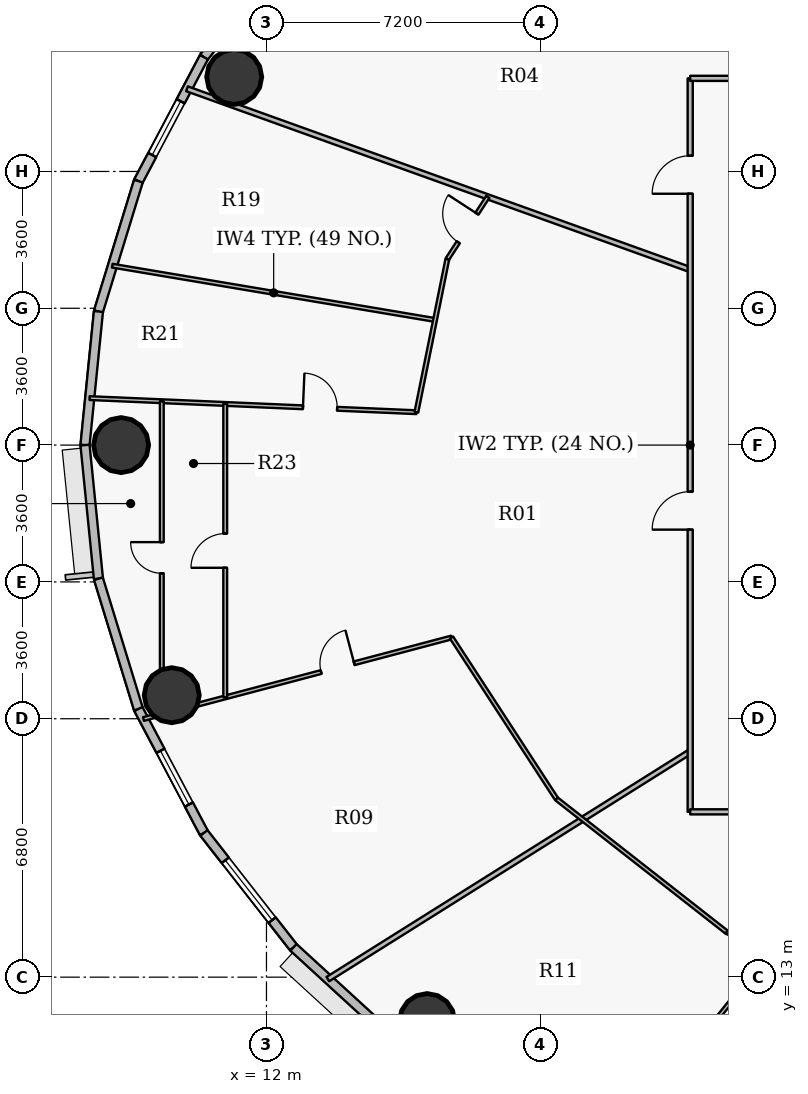
"""IFC4 building model, lengths in metres.
Left out: names, types, materials, properties, quantities, classifications, styles, units other than length and angle.
Written with IfcOpenShell. Run it as: python <this file> out.ifc"""

import sys

from ifc_helpers import new_model, si_unit, direction, frame, frame_2d, origin, origin_2d, place, context, subcontext, project, spatial, rectangle, hollow_circle, extrude, source, transform, mapped, element, fill, save


model = new_model("IFC4")
c1 = context("Model", 3, precision=1e-05, world=origin(), true_north=direction((0.0, 1.0)))
c2 = subcontext(c1, "Body", "Model", "MODEL_VIEW")
j1 = project(units=[si_unit("LENGTHUNIT", "METRE"), si_unit("PLANEANGLEUNIT", "RADIAN")], contexts=[c1])
p1 = place(None, origin())
s1 = spatial("IfcSite", under=j1, at=p1, CompositionType="ELEMENT")
p2 = place(p1, origin())
s2 = spatial("IfcBuilding", under=s1, at=p2, CompositionType="ELEMENT")
p3 = place(p2, frame((0.0, 0.0, 119.7)))
s3 = spatial("IfcBuildingStorey", under=s2, at=p3, CompositionType="ELEMENT", Elevation=119.7)
for number, where, z_axis, x_axis in (
    (1, (11.151, 36.688, 0.0), (0.0, 0.0, 1.0), (1.0, 0.0, 0.0)),
    (2, (8.175, 27.0, 0.0), (0.0, 0.0, 1.0), (1.0, 0.0, 0.0)),
    (3, (9.507, 20.419, 0.0), (0.0, 0.0, 1.0), (1.0, 0.0, 0.0)),
    (4, (16.227, 11.844, 0.0), (0.0, 0.0, 1.0), (1.0, 0.0, 0.0)),
):
    element("IfcColumn", number, at=place(p3, frame(where, z_axis=z_axis, x_axis=x_axis)), inside=s3, PredefinedType="COLUMN", context=c2, shape_type="SweptSolid", body=[
        extrude(hollow_circle(Radius=0.725, WallThickness=0.042, at=origin_2d()), origin(), (0.0, 0.0, 1.0), 3.75),
    ])
p4 = place(p3, frame((10.355, 37.206, 0.0), z_axis=(0.0, 0.0, 1.0), x_axis=(0.616272103517, 0.787533297345, 0.0)))
e5 = element("IfcWall", 5, at=p4, inside=s3, PredefinedType="SOLIDWALL", context=c2, shape_type="SweptSolid", body=[
    extrude(rectangle(XDim=3.823, YDim=0.24, at=frame_2d((1.912, 0.0))), origin(), (0.0, 0.0, 1.0), 3.5),
])
p5 = place(p4, frame((1.387, 0.0, 0.0)))
e6 = element("IfcOpeningElement", 6, at=p5, cuts=e5, PredefinedType="OPENING", context=c2, shape_type="SweptSolid", body=[
    extrude(rectangle(XDim=1.05, YDim=2.15, at=origin_2d()), frame((0.525, 0.13, 1.075), z_axis=(0.0, -1.0, 0.0), x_axis=(1.0, 0.0, 0.0)), (0.0, 0.0, 1.0), 0.26),
])
p6 = place(p3, frame((8.63, 33.945, 0.0), z_axis=(0.0, 0.0, 1.0), x_axis=(0.467614004126, 0.883932770716, 0.0)))
e7 = element("IfcWall", 7, at=p6, inside=s3, PredefinedType="SOLIDWALL", context=c2, shape_type="SweptSolid", body=[
    extrude(rectangle(XDim=3.689, YDim=0.24, at=frame_2d((1.844, 0.0))), origin(), (0.0, 0.0, 1.0), 3.5),
])
p7 = place(p6, frame((0.778, 0.0, 0.9)))
e8 = element("IfcOpeningElement", 8, at=p7, cuts=e7, PredefinedType="OPENING", context=c2, shape_type="SweptSolid", body=[
    extrude(rectangle(XDim=1.6, YDim=1.75, at=origin_2d()), frame((0.8, 0.13, 0.875), z_axis=(0.0, -1.0, 0.0), x_axis=(1.0, 0.0, 0.0)), (0.0, 0.0, 1.0), 0.26),
])
p8 = place(p3, frame((7.578, 30.515, 0.0), z_axis=(0.0, 0.0, 1.0), x_axis=(0.293124431344, 0.956074300329, 0.0)))
e9 = element("IfcWall", 9, at=p8, inside=s3, PredefinedType="SOLIDWALL", context=c2, shape_type="SweptSolid", body=[
    extrude(rectangle(XDim=3.587, YDim=0.24, at=frame_2d((1.793, 0.0))), origin(), (0.0, 0.0, 1.0), 3.5),
])
for number, where, z_axis, x_axis in (
    (10, (7.225, 27.0, 0.0), (0.0, 0.0, 1.0), (0.1, 0.995, 0.0)),
    (11, (7.578, 23.485, 0.0), (0.0, 0.0, 1.0), (-0.1, 0.995, 0.0)),
):
    element("IfcWall", number, at=place(p3, frame(where, z_axis=z_axis, x_axis=x_axis)), inside=s3, PredefinedType="SOLIDWALL", context=c2, shape_type="SweptSolid", body=[
        extrude(rectangle(XDim=3.533, YDim=0.24, at=frame_2d((1.767, 0.0))), origin(), (0.0, 0.0, 1.0), 3.5),
    ])
p9 = place(p3, frame((8.63, 20.055, 0.0), z_axis=(0.0, 0.0, 1.0), x_axis=(-0.293124431344, 0.956074300329, 0.0)))
e12 = element("IfcWall", 12, at=p9, inside=s3, PredefinedType="SOLIDWALL", context=c2, shape_type="SweptSolid", body=[
    extrude(rectangle(XDim=3.587, YDim=0.24, at=frame_2d((1.793, 0.0))), origin(), (0.0, 0.0, 1.0), 3.5),
])
p10 = place(p3, frame((10.355, 16.794, 0.0), z_axis=(0.0, 0.0, 1.0), x_axis=(-0.467614004126, 0.883932770716, 0.0)))
e13 = element("IfcWall", 13, at=p10, inside=s3, PredefinedType="SOLIDWALL", context=c2, shape_type="SweptSolid", body=[
    extrude(rectangle(XDim=3.689, YDim=0.24, at=frame_2d((1.844, 0.0))), origin(), (0.0, 0.0, 1.0), 3.5),
])
p11 = place(p10, frame((0.846, 0.0, 0.9)))
e14 = element("IfcOpeningElement", 14, at=p11, cuts=e13, PredefinedType="OPENING", context=c2, shape_type="SweptSolid", body=[
    extrude(rectangle(XDim=1.6, YDim=1.75, at=origin_2d()), frame((0.8, 0.13, 0.875), z_axis=(0.0, -1.0, 0.0), x_axis=(1.0, 0.0, 0.0)), (0.0, 0.0, 1.0), 0.26),
])
p12 = place(p3, frame((12.711, 13.783, 0.0), z_axis=(0.0, 0.0, 1.0), x_axis=(-0.616272103517, 0.787533297345, 0.0)))
e15 = element("IfcWall", 15, at=p12, inside=s3, PredefinedType="SOLIDWALL", context=c2, shape_type="SweptSolid", body=[
    extrude(rectangle(XDim=3.823, YDim=0.24, at=frame_2d((1.912, 0.0))), origin(), (0.0, 0.0, 1.0), 3.5),
])
p13 = place(p12, frame((0.912, 0.0, 0.9)))
e16 = element("IfcOpeningElement", 16, at=p13, cuts=e15, PredefinedType="OPENING", context=c2, shape_type="SweptSolid", body=[
    extrude(rectangle(XDim=2.0, YDim=1.75, at=origin_2d()), frame((1.0, 0.13, 0.875), z_axis=(0.0, -1.0, 0.0), x_axis=(1.0, 0.0, 0.0)), (0.0, 0.0, 1.0), 0.26),
])
p14 = place(p3, frame((15.642, 11.097, 0.0), z_axis=(0.0, 0.0, 1.0), x_axis=(-0.737113356241, 0.675769117414, 0.0)))
e17 = element("IfcWall", 17, at=p14, inside=s3, PredefinedType="SOLIDWALL", context=c2, shape_type="SweptSolid", body=[
    extrude(rectangle(XDim=3.976, YDim=0.24, at=frame_2d((1.988, 0.0))), origin(), (0.0, 0.0, 1.0), 3.5),
])
p15 = place(p3, frame((7.344, 28.236, 0.0), z_axis=(0.0, 0.0, 1.0), x_axis=(0.9990704445, -0.043107388317, 0.0)))
e18 = element("IfcWall", 18, at=p15, inside=s3, PredefinedType="PARTITIONING", context=c2, shape_type="SweptSolid", body=[
    extrude(rectangle(XDim=8.609, YDim=0.1, at=frame_2d((4.304, 0.0))), origin(), (0.0, 0.0, 1.0), 2.935),
])
p16 = place(p15, frame((5.621, 0.0, 0.0)))
e19 = element("IfcOpeningElement", 19, at=p16, cuts=e18, PredefinedType="OPENING", context=c2, shape_type="SweptSolid", body=[
    extrude(rectangle(XDim=0.9, YDim=2.1, at=origin_2d()), frame((0.45, 0.06, 1.05), z_axis=(0.0, -1.0, 0.0), x_axis=(1.0, 0.0, 0.0)), (0.0, 0.0, 1.0), 0.12),
])
p17 = place(p3, frame((7.943, 31.721, 0.0), z_axis=(0.0, 0.0, 1.0), x_axis=(0.986139151265, -0.165920385556, 0.0)))
e20 = element("IfcWall", 20, at=p17, inside=s3, PredefinedType="PARTITIONING", context=c2, shape_type="SweptSolid", body=[
    extrude(rectangle(XDim=8.612, YDim=0.1, at=frame_2d((4.306, 0.0))), origin(), (0.0, 0.0, 1.0), 2.935),
])
p18 = place(p3, frame((8.763, 19.792, 0.0), z_axis=(0.0, 0.0, 1.0), x_axis=(0.96671793708, 0.255844542893, 0.0)))
e21 = element("IfcWall", 21, at=p18, inside=s3, PredefinedType="PARTITIONING", context=c2, shape_type="SweptSolid", body=[
    extrude(rectangle(XDim=8.385, YDim=0.1, at=frame_2d((4.192, 0.0))), origin(), (0.0, 0.0, 1.0), 2.935),
])
p19 = place(p18, frame((4.835, 0.0, 0.0)))
e22 = element("IfcOpeningElement", 22, at=p19, cuts=e21, PredefinedType="OPENING", context=c2, shape_type="SweptSolid", body=[
    extrude(rectangle(XDim=0.9, YDim=2.1, at=origin_2d()), frame((0.45, 0.06, 1.05), z_axis=(0.0, -1.0, 0.0), x_axis=(1.0, 0.0, 0.0)), (0.0, 0.0, 1.0), 0.12),
])
p20 = place(p3, frame((9.246, 19.919, 0.0), z_axis=(0.0, 0.0, 1.0), x_axis=(0.0, 1.0, 0.0)))
e23 = element("IfcWall", 23, at=p20, inside=s3, PredefinedType="PARTITIONING", context=c2, shape_type="SweptSolid", body=[
    extrude(rectangle(XDim=8.235, YDim=0.1, at=frame_2d((4.117, 0.0))), origin(), (0.0, 0.0, 1.0), 2.935),
])
p21 = place(p20, frame((3.708, 0.0, 0.0)))
e24 = element("IfcOpeningElement", 24, at=p21, cuts=e23, PredefinedType="OPENING", context=c2, shape_type="SweptSolid", body=[
    extrude(rectangle(XDim=0.82, YDim=2.1, at=origin_2d()), frame((0.41, 0.06, 1.05), z_axis=(0.0, -1.0, 0.0), x_axis=(1.0, 0.0, 0.0)), (0.0, 0.0, 1.0), 0.12),
])
p22 = place(p3, frame((9.91, 36.375, 0.0), z_axis=(0.0, 0.0, 1.0), x_axis=(0.941089213164, -0.338158384292, 0.0)))
e25 = element("IfcWall", 25, at=p22, inside=s3, PredefinedType="PARTITIONING", context=c2, shape_type="SweptSolid", body=[
    extrude(rectangle(XDim=14.069, YDim=0.135, at=frame_2d((7.035, 0.0))), origin(), (0.0, 0.0, 1.0), 2.935),
])
p23 = place(p3, frame((10.915, 20.361, 0.0), z_axis=(0.0, 0.0, 1.0), x_axis=(0.0, 1.0, 0.0)))
e26 = element("IfcWall", 26, at=p23, inside=s3, PredefinedType="PARTITIONING", context=c2, shape_type="SweptSolid", body=[
    extrude(rectangle(XDim=7.721, YDim=0.1, at=frame_2d((3.861, 0.0))), origin(), (0.0, 0.0, 1.0), 2.935),
])
p24 = place(p23, frame((3.411, 0.0, 0.0)))
e27 = element("IfcOpeningElement", 27, at=p24, cuts=e26, PredefinedType="OPENING", context=c2, shape_type="SweptSolid", body=[
    extrude(rectangle(XDim=0.9, YDim=2.1, at=origin_2d()), frame((0.45, 0.06, 1.05), z_axis=(0.0, -1.0, 0.0), x_axis=(1.0, 0.0, 0.0)), (0.0, 0.0, 1.0), 0.12),
])
p25 = place(p3, frame((13.615, 12.948, 0.0), z_axis=(0.0, 0.0, 1.0), x_axis=(0.846963568038, 0.531650932866, 0.0)))
e28 = element("IfcWall", 28, at=p25, inside=s3, PredefinedType="PARTITIONING", context=c2, shape_type="SweptSolid", body=[
    extrude(rectangle(XDim=11.258, YDim=0.135, at=frame_2d((5.629, 0.0))), origin(), (0.0, 0.0, 1.0), 2.935),
])
p26 = place(p3, frame((15.945, 27.865, 0.0), z_axis=(0.0, 0.0, 1.0), x_axis=(0.198216891741, 0.980158183065, 0.0)))
e29 = element("IfcWall", 29, at=p26, inside=s3, PredefinedType="PARTITIONING", context=c2, shape_type="SweptSolid", body=[
    extrude(rectangle(XDim=4.111, YDim=0.1, at=frame_2d((2.056, 0.0))), origin(), (0.0, 0.0, 1.0), 3.5),
])
p27 = place(p3, frame((16.76, 31.895, 0.0), z_axis=(0.0, 0.0, 1.0), x_axis=(0.545370803514, 0.838194897786, 0.0)))
e30 = element("IfcWall", 30, at=p27, inside=s3, PredefinedType="PARTITIONING", context=c2, shape_type="SweptSolid", body=[
    extrude(rectangle(XDim=1.952, YDim=0.1, at=frame_2d((0.976, 0.0))), origin(), (0.0, 0.0, 1.0), 3.5),
])
p28 = place(p27, frame((0.526, 0.0, 0.0)))
e31 = element("IfcOpeningElement", 31, at=p28, cuts=e30, PredefinedType="OPENING", context=c2, shape_type="SweptSolid", body=[
    extrude(rectangle(XDim=0.9, YDim=2.1, at=origin_2d()), frame((0.45, 0.06, 1.05), z_axis=(0.0, -1.0, 0.0), x_axis=(1.0, 0.0, 0.0)), (0.0, 0.0, 1.0), 0.12),
])
p29 = place(p3, frame((16.869, 21.937, 0.0), z_axis=(0.0, 0.0, 1.0), x_axis=(0.545394651961, -0.838179380331, 0.0)))
e32 = element("IfcWall", 32, at=p29, inside=s3, PredefinedType="PARTITIONING", context=c2, shape_type="SweptSolid", body=[
    extrude(rectangle(XDim=5.068, YDim=0.1, at=frame_2d((2.534, 0.0))), origin(), (0.0, 0.0, 1.0), 3.5),
])
p30 = place(p3, frame((19.634, 17.689, 0.0), z_axis=(0.0, 0.0, 1.0), x_axis=(0.787333679705, -0.616527109544, 0.0)))
e33 = element("IfcWall", 33, at=p30, inside=s3, PredefinedType="PARTITIONING", context=c2, shape_type="SweptSolid", body=[
    extrude(rectangle(XDim=5.685, YDim=0.1, at=frame_2d((2.842, 0.0))), origin(), (0.0, 0.0, 1.0), 2.935),
])
p31 = place(p3, frame((20.717, 8.007, 0.0), z_axis=(0.0, 0.0, 1.0), x_axis=(0.626926430663, 0.779078462375, 0.0)))
e34 = element("IfcWall", 34, at=p31, inside=s3, PredefinedType="PARTITIONING", context=c2, shape_type="SweptSolid", body=[
    extrude(rectangle(XDim=7.317, YDim=0.1, at=frame_2d((3.658, 0.0))), origin(), (0.0, 0.0, 1.0), 2.935),
])
p32 = place(p31, frame((3.208, 0.0, 0.0)))
e35 = element("IfcOpeningElement", 35, at=p32, cuts=e34, PredefinedType="OPENING", context=c2, shape_type="SweptSolid", body=[
    extrude(rectangle(XDim=0.9, YDim=2.1, at=origin_2d()), frame((0.45, 0.06, 1.05), z_axis=(0.0, -1.0, 0.0), x_axis=(1.0, 0.0, 0.0)), (0.0, 0.0, 1.0), 0.12),
])
p33 = place(p3, frame((23.15, 17.35, 0.0), z_axis=(0.0, 0.0, 1.0), x_axis=(0.0, 1.0, 0.0)))
e36 = element("IfcWall", 36, at=p33, inside=s3, PredefinedType="PARTITIONING", context=c2, shape_type="SweptSolid", body=[
    extrude(rectangle(XDim=19.3, YDim=0.135, at=frame_2d((9.65, 0.0))), origin(), (0.0, 0.0, 1.0), 2.935),
])
p34 = place(p33, frame((16.264, 0.0, 0.0)))
e37 = element("IfcOpeningElement", 37, at=p34, cuts=e36, PredefinedType="OPENING", context=c2, shape_type="SweptSolid", body=[
    extrude(rectangle(XDim=1.0, YDim=2.15, at=origin_2d()), frame((0.5, 0.078, 1.075), z_axis=(0.0, -1.0, 0.0), x_axis=(1.0, 0.0, 0.0)), (0.0, 0.0, 1.0), 0.155),
])
p35 = place(p33, frame((7.426, 0.0, 0.0)))
e38 = element("IfcOpeningElement", 38, at=p35, cuts=e36, PredefinedType="OPENING", context=c2, shape_type="SweptSolid", body=[
    extrude(rectangle(XDim=1.0, YDim=2.15, at=origin_2d()), frame((0.5, 0.078, 1.075), z_axis=(0.0, -1.0, 0.0), x_axis=(1.0, 0.0, 0.0)), (0.0, 0.0, 1.0), 0.155),
])
p36 = place(p3, frame((23.15, 17.35, 0.0), z_axis=(0.0, 0.0, 1.0), x_axis=(1.0, 0.0, 0.0)))
e39 = element("IfcWall", 39, at=p36, inside=s3, PredefinedType="PARTITIONING", context=c2, shape_type="SweptSolid", body=[
    extrude(rectangle(XDim=10.619, YDim=0.135, at=frame_2d((5.31, 0.0))), origin(), (0.0, 0.0, 1.0), 2.935),
])
p37 = place(p36, frame((4.211, 0.0, 0.0)))
e40 = element("IfcOpeningElement", 40, at=p37, cuts=e39, PredefinedType="OPENING", context=c2, shape_type="SweptSolid", body=[
    extrude(rectangle(XDim=1.0, YDim=2.15, at=origin_2d()), frame((0.5, 0.078, 1.075), z_axis=(0.0, -1.0, 0.0), x_axis=(1.0, 0.0, 0.0)), (0.0, 0.0, 1.0), 0.155),
])
p38 = place(p3, frame((23.15, 36.65, 0.0), z_axis=(0.0, 0.0, 1.0), x_axis=(1.0, 0.0, 0.0)))
e41 = element("IfcWall", 41, at=p38, inside=s3, PredefinedType="PARTITIONING", context=c2, shape_type="SweptSolid", body=[
    extrude(rectangle(XDim=10.612, YDim=0.135, at=frame_2d((5.306, 0.0))), origin(), (0.0, 0.0, 1.0), 2.935),
])
p39 = place(p38, frame((8.182, 0.0, 0.0)))
e42 = element("IfcOpeningElement", 42, at=p39, cuts=e41, PredefinedType="OPENING", context=c2, shape_type="SweptSolid", body=[
    extrude(rectangle(XDim=1.0, YDim=2.15, at=origin_2d()), frame((0.5, 0.078, 1.075), z_axis=(0.0, -1.0, 0.0), x_axis=(1.0, 0.0, 0.0)), (0.0, 0.0, 1.0), 0.155),
])
p40 = place(p3, frame((23.33, 47.184, 0.0), z_axis=(0.0, 0.0, 1.0), x_axis=(0.531660079213, -0.846957826678, 0.0)))
e43 = element("IfcWall", 43, at=p40, inside=s3, PredefinedType="PARTITIONING", context=c2, shape_type="SweptSolid", body=[
    extrude(rectangle(XDim=12.437, YDim=0.135, at=frame_2d((6.219, 0.0))), origin(), (0.0, 0.0, 1.0), 2.935),
])
p41 = place(p3, frame((24.109, 14.184, 0.0), z_axis=(0.0, 0.0, 1.0), x_axis=(0.928816677888, -0.370539578017, 0.0)))
e44 = element("IfcWall", 44, at=p41, inside=s3, PredefinedType="PARTITIONING", context=c2, shape_type="SweptSolid", body=[
    extrude(rectangle(XDim=1.286, YDim=0.1, at=frame_2d((0.643, 0.0))), origin(), (0.0, 0.0, 1.0), 3.035),
])
m1 = source(origin(), c2, "Body", "SweptSolid", [
    extrude(rectangle(XDim=1.6, YDim=1.75, at=origin_2d()), frame((0.8, 0.03, 0.875), z_axis=(0.0, -1.0, 0.0), x_axis=(1.0, 0.0, 0.0)), (0.0, 0.0, 1.0), 0.06),
])
p42 = place(p7, origin())
e45 = element("IfcWindow", 45, at=p42, inside=s3, PartitioningType="DOUBLE_PANEL_VERTICAL", PredefinedType="WINDOW", context=c2, shape_type="MappedRepresentation", body=[
    mapped(m1, transform((0.0, 0.0, 0.0), x_axis=(1.0, 0.0, 0.0), y_axis=(0.0, 1.0, 0.0), z_axis=(0.0, 0.0, 1.0), scale=1.0)),
])
fill(e8, e45)
p43 = place(p11, origin())
e46 = element("IfcWindow", 46, at=p43, inside=s3, PartitioningType="DOUBLE_PANEL_VERTICAL", PredefinedType="WINDOW", context=c2, shape_type="MappedRepresentation", body=[
    mapped(m1, transform((0.0, 0.0, 0.0), x_axis=(1.0, 0.0, 0.0), y_axis=(0.0, 1.0, 0.0), z_axis=(0.0, 0.0, 1.0), scale=1.0)),
])
fill(e14, e46)
m2 = source(origin(), c2, "Body", "SweptSolid", [
    extrude(rectangle(XDim=2.0, YDim=1.75, at=origin_2d()), frame((1.0, 0.03, 0.875), z_axis=(0.0, -1.0, 0.0), x_axis=(1.0, 0.0, 0.0)), (0.0, 0.0, 1.0), 0.06),
])
p44 = place(p13, origin())
e47 = element("IfcWindow", 47, at=p44, inside=s3, PartitioningType="DOUBLE_PANEL_VERTICAL", PredefinedType="WINDOW", context=c2, shape_type="MappedRepresentation", body=[
    mapped(m2, transform((0.0, 0.0, 0.0), x_axis=(1.0, 0.0, 0.0), y_axis=(0.0, 1.0, 0.0), z_axis=(0.0, 0.0, 1.0), scale=1.0)),
])
fill(e16, e47)
m3 = source(origin(), c2, "Body", "SweptSolid", [
    extrude(rectangle(XDim=1.0, YDim=2.15, at=origin_2d()), frame((0.5, 0.025, 1.075), z_axis=(0.0, -1.0, 0.0), x_axis=(1.0, 0.0, 0.0)), (0.0, 0.0, 1.0), 0.05),
])
p45 = place(p34, origin())
e48 = element("IfcDoor", 48, at=p45, inside=s3, OperationType="SINGLE_SWING_LEFT", PredefinedType="DOOR", context=c2, shape_type="MappedRepresentation", body=[
    mapped(m3, transform((0.0, 0.0, 0.0), x_axis=(1.0, 0.0, 0.0), y_axis=(0.0, 1.0, 0.0), z_axis=(0.0, 0.0, 1.0), scale=1.0)),
])
fill(e37, e48)
p46 = place(p35, origin())
e49 = element("IfcDoor", 49, at=p46, inside=s3, OperationType="SINGLE_SWING_LEFT", PredefinedType="DOOR", context=c2, shape_type="MappedRepresentation", body=[
    mapped(m3, transform((0.0, 0.0, 0.0), x_axis=(1.0, 0.0, 0.0), y_axis=(0.0, 1.0, 0.0), z_axis=(0.0, 0.0, 1.0), scale=1.0)),
])
fill(e38, e49)
m4 = source(origin(), c2, "Body", "SweptSolid", [
    extrude(rectangle(XDim=0.9, YDim=2.1, at=origin_2d()), frame((0.45, 0.025, 1.05), z_axis=(0.0, -1.0, 0.0), x_axis=(1.0, 0.0, 0.0)), (0.0, 0.0, 1.0), 0.05),
])
p47 = place(p28, origin())
e50 = element("IfcDoor", 50, at=p47, inside=s3, OperationType="SINGLE_SWING_RIGHT", PredefinedType="DOOR", context=c2, shape_type="MappedRepresentation", body=[
    mapped(m4, transform((0.0, 0.0, 0.0), x_axis=(1.0, 0.0, 0.0), y_axis=(0.0, 1.0, 0.0), z_axis=(0.0, 0.0, 1.0), scale=1.0)),
])
fill(e31, e50)
p48 = place(p16, origin())
e51 = element("IfcDoor", 51, at=p48, inside=s3, OperationType="SINGLE_SWING_LEFT", PredefinedType="DOOR", context=c2, shape_type="MappedRepresentation", body=[
    mapped(m4, transform((0.0, 0.0, 0.0), x_axis=(1.0, 0.0, 0.0), y_axis=(0.0, 1.0, 0.0), z_axis=(0.0, 0.0, 1.0), scale=1.0)),
])
fill(e19, e51)
p49 = place(p19, origin())
e52 = element("IfcDoor", 52, at=p49, inside=s3, OperationType="SINGLE_SWING_RIGHT", PredefinedType="DOOR", context=c2, shape_type="MappedRepresentation", body=[
    mapped(m4, transform((0.0, 0.0, 0.0), x_axis=(1.0, 0.0, 0.0), y_axis=(0.0, 1.0, 0.0), z_axis=(0.0, 0.0, 1.0), scale=1.0)),
])
fill(e22, e52)
p50 = place(p24, origin())
e53 = element("IfcDoor", 53, at=p50, inside=s3, OperationType="SINGLE_SWING_LEFT", PredefinedType="DOOR", context=c2, shape_type="MappedRepresentation", body=[
    mapped(m4, transform((0.0, 0.0, 0.0), x_axis=(1.0, 0.0, 0.0), y_axis=(0.0, 1.0, 0.0), z_axis=(0.0, 0.0, 1.0), scale=1.0)),
])
fill(e27, e53)
m5 = source(origin(), c2, "Body", "SweptSolid", [
    extrude(rectangle(XDim=0.82, YDim=2.1, at=origin_2d()), frame((0.41, 0.025, 1.05), z_axis=(0.0, -1.0, 0.0), x_axis=(1.0, 0.0, 0.0)), (0.0, 0.0, 1.0), 0.05),
])
p51 = place(p21, origin())
e54 = element("IfcDoor", 54, at=p51, inside=s3, OperationType="SINGLE_SWING_RIGHT", PredefinedType="DOOR", context=c2, shape_type="MappedRepresentation", body=[
    mapped(m5, transform((0.0, 0.0, 0.0), x_axis=(1.0, 0.0, 0.0), y_axis=(0.0, 1.0, 0.0), z_axis=(0.0, 0.0, 1.0), scale=1.0)),
])
fill(e24, e54)
save(model, sys.argv[1])
